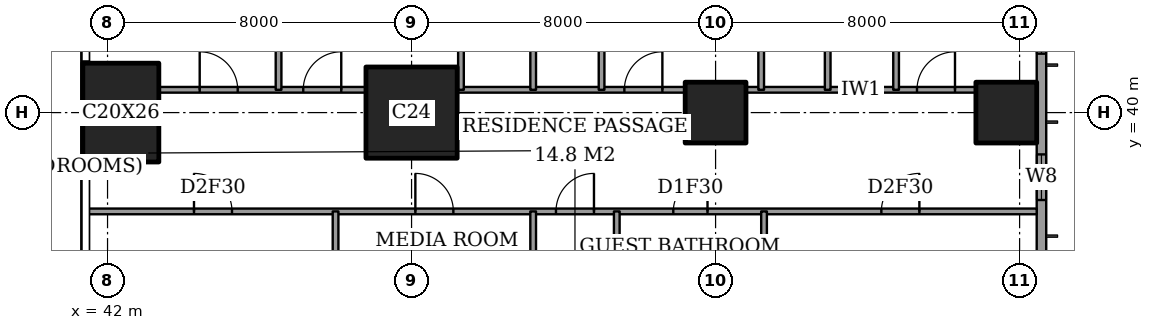
"""IFC4 building model, lengths in metres.
Left out: names, types, materials, properties, quantities, classifications, styles, units other than length and angle.
Written with IfcOpenShell. Run it as: python <this file> out.ifc"""

import sys

from ifc_helpers import new_model, si_unit, direction, frame, frame_2d, origin, origin_2d, place, context, subcontext, project, spatial, rectangle, extrude, element, fill, save


model = new_model("IFC4")
c1 = context("Model", 3, precision=1e-05, world=origin(), true_north=direction((0.0, 1.0)))
c2 = subcontext(c1, "Body", "Model", "MODEL_VIEW")
j1 = project(units=[si_unit("LENGTHUNIT", "METRE"), si_unit("PLANEANGLEUNIT", "RADIAN")], contexts=[c1])
p1 = place(None, origin())
s1 = spatial("IfcSite", under=j1, at=p1, CompositionType="ELEMENT")
p2 = place(p1, origin())
s2 = spatial("IfcBuilding", under=s1, at=p2, CompositionType="ELEMENT")
p3 = place(p2, frame((0.0, 0.0, 270.0)))
s3 = spatial("IfcBuildingStorey", under=s2, at=p3, CompositionType="ELEMENT", Elevation=270.0)
p4 = place(p3, frame((42.35, 40.0, 0.0), z_axis=(0.0, 0.0, 1.0), x_axis=(1.0, 0.0, 0.0)))
e1 = element("IfcColumn", 1, at=p4, inside=s3, PredefinedType="COLUMN", context=c2, shape_type="SweptSolid", body=[
    extrude(rectangle(XDim=2.0, YDim=2.6, at=origin_2d()), origin(), (0.0, 0.0, 1.0), 3.6),
])
p5 = place(p3, frame((50.0, 40.0, 0.0), z_axis=(0.0, 0.0, 1.0), x_axis=(1.0, 0.0, 0.0)))
e2 = element("IfcColumn", 2, at=p5, inside=s3, PredefinedType="COLUMN", context=c2, shape_type="SweptSolid", body=[
    extrude(rectangle(XDim=2.4, YDim=2.4, at=origin_2d()), origin(), (0.0, 0.0, 1.0), 3.6),
])
for number, where, z_axis, x_axis in (
    (3, (58.0, 40.0, 0.0), (0.0, 0.0, 1.0), (1.0, 0.0, 0.0)),
    (4, (65.65, 40.0, 0.0), (0.0, 0.0, 1.0), (1.0, 0.0, 0.0)),
):
    element("IfcColumn", number, at=place(p3, frame(where, z_axis=z_axis, x_axis=x_axis)), inside=s3, PredefinedType="COLUMN", context=c2, shape_type="SweptSolid", body=[
        extrude(rectangle(XDim=1.6, YDim=1.6, at=origin_2d()), origin(), (0.0, 0.0, 1.0), 3.6),
    ])
p6 = place(p3, frame((66.575, 3.175, 0.0), z_axis=(0.0, 0.0, 1.0), x_axis=(0.0, 1.0, 0.0)))
e5 = element("IfcWall", 5, at=p6, inside=s3, PredefinedType="SOLIDWALL", context=c2, shape_type="SweptSolid", body=[
    extrude(rectangle(XDim=41.65, YDim=0.25, at=frame_2d((20.825, 0.0))), origin(), (0.0, 0.0, 1.0), 3.6),
])
p7 = place(p6, frame((0.875, 0.0, 0.6)))
e6 = element("IfcOpeningElement", 6, at=p7, cuts=e5, PredefinedType="OPENING", context=c2, shape_type="SweptSolid", body=[
    extrude(rectangle(XDim=2.4, YDim=2.0, at=frame_2d((1.2, 1.0))), frame((0.0, 0.135, 0.0), z_axis=(0.0, -1.0, 0.0), x_axis=(1.0, 0.0, 0.0)), (0.0, 0.0, 1.0), 0.27),
])
p8 = place(p6, frame((6.0, 0.0, 0.6)))
e7 = element("IfcOpeningElement", 7, at=p8, cuts=e5, PredefinedType="OPENING", context=c2, shape_type="SweptSolid", body=[
    extrude(rectangle(XDim=1.2, YDim=2.0, at=frame_2d((0.6, 1.0))), frame((0.0, 0.135, 0.0), z_axis=(0.0, -1.0, 0.0), x_axis=(1.0, 0.0, 0.0)), (0.0, 0.0, 1.0), 0.27),
])
p9 = place(p6, frame((8.525, 0.0, 0.6)))
e8 = element("IfcOpeningElement", 8, at=p9, cuts=e5, PredefinedType="OPENING", context=c2, shape_type="SweptSolid", body=[
    extrude(rectangle(XDim=2.4, YDim=2.0, at=frame_2d((1.2, 1.0))), frame((0.0, 0.135, 0.0), z_axis=(0.0, -1.0, 0.0), x_axis=(1.0, 0.0, 0.0)), (0.0, 0.0, 1.0), 0.27),
])
p10 = place(p6, frame((15.725, 0.0, 0.6)))
e9 = element("IfcOpeningElement", 9, at=p10, cuts=e5, PredefinedType="OPENING", context=c2, shape_type="SweptSolid", body=[
    extrude(rectangle(XDim=2.4, YDim=2.0, at=frame_2d((1.2, 1.0))), frame((0.0, 0.135, 0.0), z_axis=(0.0, -1.0, 0.0), x_axis=(1.0, 0.0, 0.0)), (0.0, 0.0, 1.0), 0.27),
])
p11 = place(p6, frame((23.625, 0.0, 0.6)))
e10 = element("IfcOpeningElement", 10, at=p11, cuts=e5, PredefinedType="OPENING", context=c2, shape_type="SweptSolid", body=[
    extrude(rectangle(XDim=2.4, YDim=2.0, at=frame_2d((1.2, 1.0))), frame((0.0, 0.135, 0.0), z_axis=(0.0, -1.0, 0.0), x_axis=(1.0, 0.0, 0.0)), (0.0, 0.0, 1.0), 0.27),
])
p12 = place(p6, frame((30.725, 0.0, 0.6)))
e11 = element("IfcOpeningElement", 11, at=p12, cuts=e5, PredefinedType="OPENING", context=c2, shape_type="SweptSolid", body=[
    extrude(rectangle(XDim=2.4, YDim=2.0, at=frame_2d((1.2, 1.0))), frame((0.0, 0.135, 0.0), z_axis=(0.0, -1.0, 0.0), x_axis=(1.0, 0.0, 0.0)), (0.0, 0.0, 1.0), 0.27),
])
p13 = place(p6, frame((34.525, 0.0, 0.6)))
e12 = element("IfcOpeningElement", 12, at=p13, cuts=e5, PredefinedType="OPENING", context=c2, shape_type="SweptSolid", body=[
    extrude(rectangle(XDim=1.2, YDim=2.0, at=frame_2d((0.6, 1.0))), frame((0.0, 0.135, 0.0), z_axis=(0.0, -1.0, 0.0), x_axis=(1.0, 0.0, 0.0)), (0.0, 0.0, 1.0), 0.27),
])
p14 = place(p6, frame((38.375, 0.0, 0.6)))
e13 = element("IfcOpeningElement", 13, at=p14, cuts=e5, PredefinedType="OPENING", context=c2, shape_type="SweptSolid", body=[
    extrude(rectangle(XDim=2.4, YDim=2.0, at=frame_2d((1.2, 1.0))), frame((0.0, 0.135, 0.0), z_axis=(0.0, -1.0, 0.0), x_axis=(1.0, 0.0, 0.0)), (0.0, 0.0, 1.0), 0.27),
])
p15 = place(p3, frame((41.439, 37.4, 0.0), z_axis=(0.0, 0.0, 1.0), x_axis=(1.0, 0.0, 0.0)))
e14 = element("IfcWall", 14, at=p15, inside=s3, PredefinedType="PARTITIONING", context=c2, shape_type="SweptSolid", body=[
    extrude(rectangle(XDim=25.011, YDim=0.15, at=frame_2d((12.505, 0.0))), origin(), (0.0, 0.0, 1.0), 3.35),
])
p16 = place(p15, frame((12.361, 0.0, 0.0)))
e15 = element("IfcOpeningElement", 15, at=p16, cuts=e14, PredefinedType="OPENING", context=c2, shape_type="SweptSolid", body=[
    extrude(rectangle(XDim=1.0, YDim=2.1, at=frame_2d((0.5, 1.05))), frame((0.0, 0.085, 0.0), z_axis=(0.0, -1.0, 0.0), x_axis=(1.0, 0.0, 0.0)), (0.0, 0.0, 1.0), 0.17),
])
p17 = place(p15, frame((20.924, 0.0, 0.0)))
e16 = element("IfcOpeningElement", 16, at=p17, cuts=e14, PredefinedType="OPENING", context=c2, shape_type="SweptSolid", body=[
    extrude(rectangle(XDim=1.0, YDim=2.1, at=frame_2d((0.5, 1.05))), frame((0.0, 0.085, 0.0), z_axis=(0.0, -1.0, 0.0), x_axis=(1.0, 0.0, 0.0)), (0.0, 0.0, 1.0), 0.17),
])
p18 = place(p15, frame((15.448, 0.0, 0.0)))
e17 = element("IfcOpeningElement", 17, at=p18, cuts=e14, PredefinedType="OPENING", context=c2, shape_type="SweptSolid", body=[
    extrude(rectangle(XDim=0.9, YDim=2.1, at=frame_2d((0.45, 1.05))), frame((0.0, 0.085, 0.0), z_axis=(0.0, -1.0, 0.0), x_axis=(1.0, 0.0, 0.0)), (0.0, 0.0, 1.0), 0.17),
])
p19 = place(p15, frame((8.661, 0.0, 0.0)))
e18 = element("IfcOpeningElement", 18, at=p19, cuts=e14, PredefinedType="OPENING", context=c2, shape_type="SweptSolid", body=[
    extrude(rectangle(XDim=1.0, YDim=2.1, at=frame_2d((0.5, 1.05))), frame((0.0, 0.085, 0.0), z_axis=(0.0, -1.0, 0.0), x_axis=(1.0, 0.0, 0.0)), (0.0, 0.0, 1.0), 0.17),
])
p20 = place(p15, frame((2.836, 0.0, 0.0)))
e19 = element("IfcOpeningElement", 19, at=p20, cuts=e14, PredefinedType="OPENING", context=c2, shape_type="SweptSolid", body=[
    extrude(rectangle(XDim=1.0, YDim=2.1, at=frame_2d((0.5, 1.05))), frame((0.0, 0.085, 0.0), z_axis=(0.0, -1.0, 0.0), x_axis=(1.0, 0.0, 0.0)), (0.0, 0.0, 1.0), 0.17),
])
p21 = place(p3, frame((43.35, 40.6, 0.0), z_axis=(0.0, 0.0, 1.0), x_axis=(1.0, 0.0, 0.0)))
e20 = element("IfcWall", 20, at=p21, inside=s3, PredefinedType="PARTITIONING", context=c2, shape_type="SweptSolid", body=[
    extrude(rectangle(XDim=5.45, YDim=0.15, at=frame_2d((2.725, 0.0))), origin(), (0.0, 0.0, 1.0), 3.35),
])
p22 = place(p21, frame((3.8, 0.0, 0.0)))
e21 = element("IfcOpeningElement", 21, at=p22, cuts=e20, PredefinedType="OPENING", context=c2, shape_type="SweptSolid", body=[
    extrude(rectangle(XDim=1.0, YDim=2.1, at=frame_2d((0.5, 1.05))), frame((0.0, 0.085, 0.0), z_axis=(0.0, -1.0, 0.0), x_axis=(1.0, 0.0, 0.0)), (0.0, 0.0, 1.0), 0.17),
])
p23 = place(p21, frame((1.075, 0.0, 0.0)))
e22 = element("IfcOpeningElement", 22, at=p23, cuts=e20, PredefinedType="OPENING", context=c2, shape_type="SweptSolid", body=[
    extrude(rectangle(XDim=1.0, YDim=2.1, at=frame_2d((0.5, 1.05))), frame((0.0, 0.085, 0.0), z_axis=(0.0, -1.0, 0.0), x_axis=(1.0, 0.0, 0.0)), (0.0, 0.0, 1.0), 0.17),
])
p24 = place(p3, frame((51.2, 40.6, 0.0), z_axis=(0.0, 0.0, 1.0), x_axis=(1.0, 0.0, 0.0)))
e23 = element("IfcWall", 23, at=p24, inside=s3, PredefinedType="PARTITIONING", context=c2, shape_type="SweptSolid", body=[
    extrude(rectangle(XDim=6.0, YDim=0.15, at=frame_2d((3.0, 0.0))), origin(), (0.0, 0.0, 1.0), 3.35),
])
p25 = place(p24, frame((4.4, 0.0, 0.0)))
e24 = element("IfcOpeningElement", 24, at=p25, cuts=e23, PredefinedType="OPENING", context=c2, shape_type="SweptSolid", body=[
    extrude(rectangle(XDim=1.0, YDim=2.1, at=frame_2d((0.5, 1.05))), frame((0.0, 0.085, 0.0), z_axis=(0.0, -1.0, 0.0), x_axis=(1.0, 0.0, 0.0)), (0.0, 0.0, 1.0), 0.17),
])
p26 = place(p3, frame((58.8, 40.6, 0.0), z_axis=(0.0, 0.0, 1.0), x_axis=(1.0, 0.0, 0.0)))
e25 = element("IfcWall", 25, at=p26, inside=s3, PredefinedType="PARTITIONING", context=c2, shape_type="SweptSolid", body=[
    extrude(rectangle(XDim=6.05, YDim=0.15, at=frame_2d((3.025, 0.0))), origin(), (0.0, 0.0, 1.0), 3.35),
])
p27 = place(p26, frame((4.5, 0.0, 0.0)))
e26 = element("IfcOpeningElement", 26, at=p27, cuts=e25, PredefinedType="OPENING", context=c2, shape_type="SweptSolid", body=[
    extrude(rectangle(XDim=1.0, YDim=2.1, at=frame_2d((0.5, 1.05))), frame((0.0, 0.085, 0.0), z_axis=(0.0, -1.0, 0.0), x_axis=(1.0, 0.0, 0.0)), (0.0, 0.0, 1.0), 0.17),
])
p28 = place(p3, frame((46.5, 40.6, 0.0), z_axis=(0.0, 0.0, 1.0), x_axis=(0.0, 1.0, 0.0)))
e27 = element("IfcWall", 27, at=p28, inside=s3, PredefinedType="PARTITIONING", context=c2, shape_type="SweptSolid", body=[
    extrude(rectangle(XDim=7.85, YDim=0.15, at=frame_2d((3.925, 0.0))), origin(), (0.0, 0.0, 1.0), 3.35),
])
p29 = place(p3, frame((48.0, 28.0, 0.0), z_axis=(0.0, 0.0, 1.0), x_axis=(0.0, 1.0, 0.0)))
e28 = element("IfcWall", 28, at=p29, inside=s3, PredefinedType="PARTITIONING", context=c2, shape_type="SweptSolid", body=[
    extrude(rectangle(XDim=9.4, YDim=0.15, at=frame_2d((4.7, 0.0))), origin(), (0.0, 0.0, 1.0), 3.35),
])
p30 = place(p29, frame((0.837, 0.0, 0.0)))
e29 = element("IfcOpeningElement", 29, at=p30, cuts=e28, PredefinedType="OPENING", context=c2, shape_type="SweptSolid", body=[
    extrude(rectangle(XDim=1.0, YDim=2.1, at=frame_2d((0.5, 1.05))), frame((0.0, 0.085, 0.0), z_axis=(0.0, -1.0, 0.0), x_axis=(1.0, 0.0, 0.0)), (0.0, 0.0, 1.0), 0.17),
])
p31 = place(p3, frame((51.3, 40.6, 0.0), z_axis=(0.0, 0.0, 1.0), x_axis=(0.0, 1.0, 0.0)))
e30 = element("IfcWall", 30, at=p31, inside=s3, PredefinedType="PARTITIONING", context=c2, shape_type="SweptSolid", body=[
    extrude(rectangle(XDim=7.85, YDim=0.15, at=frame_2d((3.925, 0.0))), origin(), (0.0, 0.0, 1.0), 3.35),
])
p32 = place(p31, frame((3.475, 0.0, 0.0)))
e31 = element("IfcOpeningElement", 31, at=p32, cuts=e30, PredefinedType="OPENING", context=c2, shape_type="SweptSolid", body=[
    extrude(rectangle(XDim=0.9, YDim=2.1, at=frame_2d((0.45, 1.05))), frame((0.0, 0.085, 0.0), z_axis=(0.0, -1.0, 0.0), x_axis=(1.0, 0.0, 0.0)), (0.0, 0.0, 1.0), 0.17),
])
p33 = place(p3, frame((53.2, 30.675, 0.0), z_axis=(0.0, 0.0, 1.0), x_axis=(0.0, 1.0, 0.0)))
e32 = element("IfcWall", 32, at=p33, inside=s3, PredefinedType="PARTITIONING", context=c2, shape_type="SweptSolid", body=[
    extrude(rectangle(XDim=6.725, YDim=0.15, at=frame_2d((3.362, 0.0))), origin(), (0.0, 0.0, 1.0), 3.35),
])
p34 = place(p3, frame((53.2, 40.6, 0.0), z_axis=(0.0, 0.0, 1.0), x_axis=(0.0, 1.0, 0.0)))
e33 = element("IfcWall", 33, at=p34, inside=s3, PredefinedType="PARTITIONING", context=c2, shape_type="SweptSolid", body=[
    extrude(rectangle(XDim=7.85, YDim=0.15, at=frame_2d((3.925, 0.0))), origin(), (0.0, 0.0, 1.0), 3.35),
])
p35 = place(p3, frame((55.0, 40.6, 0.0), z_axis=(0.0, 0.0, 1.0), x_axis=(0.0, 1.0, 0.0)))
e34 = element("IfcWall", 34, at=p35, inside=s3, PredefinedType="PARTITIONING", context=c2, shape_type="SweptSolid", body=[
    extrude(rectangle(XDim=7.85, YDim=0.15, at=frame_2d((3.925, 0.0))), origin(), (0.0, 0.0, 1.0), 3.35),
])
p36 = place(p35, frame((3.475, 0.0, 0.0)))
e35 = element("IfcOpeningElement", 35, at=p36, cuts=e34, PredefinedType="OPENING", context=c2, shape_type="SweptSolid", body=[
    extrude(rectangle(XDim=0.9, YDim=2.1, at=frame_2d((0.45, 1.05))), frame((0.0, 0.085, 0.0), z_axis=(0.0, -1.0, 0.0), x_axis=(1.0, 0.0, 0.0)), (0.0, 0.0, 1.0), 0.17),
])
p37 = place(p3, frame((55.4, 28.0, 0.0), z_axis=(0.0, 0.0, 1.0), x_axis=(0.0, 1.0, 0.0)))
e36 = element("IfcWall", 36, at=p37, inside=s3, PredefinedType="PARTITIONING", context=c2, shape_type="SweptSolid", body=[
    extrude(rectangle(XDim=9.4, YDim=0.15, at=frame_2d((4.7, 0.0))), origin(), (0.0, 0.0, 1.0), 3.35),
])
p38 = place(p37, frame((0.837, 0.0, 0.0)))
e37 = element("IfcOpeningElement", 37, at=p38, cuts=e36, PredefinedType="OPENING", context=c2, shape_type="SweptSolid", body=[
    extrude(rectangle(XDim=1.0, YDim=2.1, at=frame_2d((0.5, 1.05))), frame((0.0, 0.085, 0.0), z_axis=(0.0, -1.0, 0.0), x_axis=(1.0, 0.0, 0.0)), (0.0, 0.0, 1.0), 0.17),
])
p39 = place(p3, frame((59.2, 40.6, 0.0), z_axis=(0.0, 0.0, 1.0), x_axis=(0.0, 1.0, 0.0)))
e38 = element("IfcWall", 38, at=p39, inside=s3, PredefinedType="PARTITIONING", context=c2, shape_type="SweptSolid", body=[
    extrude(rectangle(XDim=7.85, YDim=0.15, at=frame_2d((3.925, 0.0))), origin(), (0.0, 0.0, 1.0), 3.35),
])
p40 = place(p3, frame((59.275, 33.2, 0.0), z_axis=(0.0, 0.0, 1.0), x_axis=(0.0, 1.0, 0.0)))
e39 = element("IfcWall", 39, at=p40, inside=s3, PredefinedType="PARTITIONING", context=c2, shape_type="SweptSolid", body=[
    extrude(rectangle(XDim=4.2, YDim=0.15, at=frame_2d((2.1, 0.0))), origin(), (0.0, 0.0, 1.0), 3.35),
])
p41 = place(p3, frame((60.95, 40.6, 0.0), z_axis=(0.0, 0.0, 1.0), x_axis=(0.0, 1.0, 0.0)))
e40 = element("IfcWall", 40, at=p41, inside=s3, PredefinedType="PARTITIONING", context=c2, shape_type="SweptSolid", body=[
    extrude(rectangle(XDim=7.85, YDim=0.15, at=frame_2d((3.925, 0.0))), origin(), (0.0, 0.0, 1.0), 3.35),
])
p42 = place(p41, frame((5.225, 0.0, 0.0)))
e41 = element("IfcOpeningElement", 41, at=p42, cuts=e40, PredefinedType="OPENING", context=c2, shape_type="SweptSolid", body=[
    extrude(rectangle(XDim=0.9, YDim=2.1, at=frame_2d((0.45, 1.05))), frame((0.0, 0.085, 0.0), z_axis=(0.0, -1.0, 0.0), x_axis=(1.0, 0.0, 0.0)), (0.0, 0.0, 1.0), 0.17),
])
p43 = place(p3, frame((62.75, 40.6, 0.0), z_axis=(0.0, 0.0, 1.0), x_axis=(0.0, 1.0, 0.0)))
e42 = element("IfcWall", 42, at=p43, inside=s3, PredefinedType="PARTITIONING", context=c2, shape_type="SweptSolid", body=[
    extrude(rectangle(XDim=3.5, YDim=0.15, at=frame_2d((1.75, 0.0))), origin(), (0.0, 0.0, 1.0), 3.35),
])
p44 = place(p43, frame((1.3, 0.0, 0.0)))
e43 = element("IfcOpeningElement", 43, at=p44, cuts=e42, PredefinedType="OPENING", context=c2, shape_type="SweptSolid", body=[
    extrude(rectangle(XDim=0.9, YDim=2.1, at=frame_2d((0.45, 1.05))), frame((0.0, 0.085, 0.0), z_axis=(0.0, -1.0, 0.0), x_axis=(1.0, 0.0, 0.0)), (0.0, 0.0, 1.0), 0.17),
])
p45 = place(p13, origin())
e44 = element("IfcWindow", 44, at=p45, inside=s3, PartitioningType="SINGLE_PANEL", PredefinedType="WINDOW", context=c2, shape_type="SweptSolid", body=[
    extrude(rectangle(XDim=1.2, YDim=2.0, at=frame_2d((0.6, 1.0))), frame((0.0, 0.03, 0.0), z_axis=(0.0, -1.0, 0.0), x_axis=(1.0, 0.0, 0.0)), (0.0, 0.0, 1.0), 0.06),
])
fill(e12, e44)
p46 = place(p14, origin())
e45 = element("IfcWindow", 45, at=p46, inside=s3, PartitioningType="SINGLE_PANEL", PredefinedType="WINDOW", context=c2, shape_type="SweptSolid", body=[
    extrude(rectangle(XDim=2.4, YDim=2.0, at=frame_2d((1.2, 1.0))), frame((0.0, 0.03, 0.0), z_axis=(0.0, -1.0, 0.0), x_axis=(1.0, 0.0, 0.0)), (0.0, 0.0, 1.0), 0.06),
])
fill(e13, e45)
p47 = place(p27, origin())
e46 = element("IfcDoor", 46, at=p47, inside=s3, OperationType="SINGLE_SWING_LEFT", PredefinedType="DOOR", context=c2, shape_type="SweptSolid", body=[
    extrude(rectangle(XDim=1.0, YDim=2.1, at=frame_2d((0.5, 1.05))), frame((0.0, 0.025, 0.0), z_axis=(0.0, -1.0, 0.0), x_axis=(1.0, 0.0, 0.0)), (0.0, 0.0, 1.0), 0.05),
])
fill(e26, e46)
p48 = place(p25, origin())
e47 = element("IfcDoor", 47, at=p48, inside=s3, OperationType="SINGLE_SWING_LEFT", PredefinedType="DOOR", context=c2, shape_type="SweptSolid", body=[
    extrude(rectangle(XDim=1.0, YDim=2.1, at=frame_2d((0.5, 1.05))), frame((0.0, 0.025, 0.0), z_axis=(0.0, -1.0, 0.0), x_axis=(1.0, 0.0, 0.0)), (0.0, 0.0, 1.0), 0.05),
])
fill(e24, e47)
p49 = place(p22, origin())
e48 = element("IfcDoor", 48, at=p49, inside=s3, OperationType="SINGLE_SWING_LEFT", PredefinedType="DOOR", context=c2, shape_type="SweptSolid", body=[
    extrude(rectangle(XDim=1.0, YDim=2.1, at=frame_2d((0.5, 1.05))), frame((0.0, 0.025, 0.0), z_axis=(0.0, -1.0, 0.0), x_axis=(1.0, 0.0, 0.0)), (0.0, 0.0, 1.0), 0.05),
])
fill(e21, e48)
p50 = place(p23, origin())
e49 = element("IfcDoor", 49, at=p50, inside=s3, OperationType="SINGLE_SWING_RIGHT", PredefinedType="DOOR", context=c2, shape_type="SweptSolid", body=[
    extrude(rectangle(XDim=1.0, YDim=2.1, at=frame_2d((0.5, 1.05))), frame((0.0, 0.025, 0.0), z_axis=(0.0, -1.0, 0.0), x_axis=(1.0, 0.0, 0.0)), (0.0, 0.0, 1.0), 0.05),
])
fill(e22, e49)
p51 = place(p16, origin())
e50 = element("IfcDoor", 50, at=p51, inside=s3, OperationType="SINGLE_SWING_LEFT", PredefinedType="DOOR", context=c2, shape_type="SweptSolid", body=[
    extrude(rectangle(XDim=1.0, YDim=2.1, at=frame_2d((0.5, 1.05))), frame((0.0, 0.025, 0.0), z_axis=(0.0, -1.0, 0.0), x_axis=(1.0, 0.0, 0.0)), (0.0, 0.0, 1.0), 0.05),
])
fill(e15, e50)
p52 = place(p17, origin())
e51 = element("IfcDoor", 51, at=p52, inside=s3, OperationType="SINGLE_SWING_LEFT", PredefinedType="DOOR", context=c2, shape_type="SweptSolid", body=[
    extrude(rectangle(XDim=1.0, YDim=2.1, at=frame_2d((0.5, 1.05))), frame((0.0, 0.025, 0.0), z_axis=(0.0, -1.0, 0.0), x_axis=(1.0, 0.0, 0.0)), (0.0, 0.0, 1.0), 0.05),
])
fill(e16, e51)
p53 = place(p18, origin())
e52 = element("IfcDoor", 52, at=p53, inside=s3, OperationType="SINGLE_SWING_LEFT", PredefinedType="DOOR", context=c2, shape_type="SweptSolid", body=[
    extrude(rectangle(XDim=0.9, YDim=2.1, at=frame_2d((0.45, 1.05))), frame((0.0, 0.025, 0.0), z_axis=(0.0, -1.0, 0.0), x_axis=(1.0, 0.0, 0.0)), (0.0, 0.0, 1.0), 0.05),
])
fill(e17, e52)
p54 = place(p19, origin())
e53 = element("IfcDoor", 53, at=p54, inside=s3, OperationType="SINGLE_SWING_RIGHT", PredefinedType="DOOR", context=c2, shape_type="SweptSolid", body=[
    extrude(rectangle(XDim=1.0, YDim=2.1, at=frame_2d((0.5, 1.05))), frame((0.0, 0.025, 0.0), z_axis=(0.0, -1.0, 0.0), x_axis=(1.0, 0.0, 0.0)), (0.0, 0.0, 1.0), 0.05),
])
fill(e18, e53)
p55 = place(p20, origin())
e54 = element("IfcDoor", 54, at=p55, inside=s3, OperationType="SINGLE_SWING_RIGHT", PredefinedType="DOOR", context=c2, shape_type="SweptSolid", body=[
    extrude(rectangle(XDim=1.0, YDim=2.1, at=frame_2d((0.5, 1.05))), frame((0.0, 0.025, 0.0), z_axis=(0.0, -1.0, 0.0), x_axis=(1.0, 0.0, 0.0)), (0.0, 0.0, 1.0), 0.05),
])
fill(e19, e54)
save(model, sys.argv[1])
